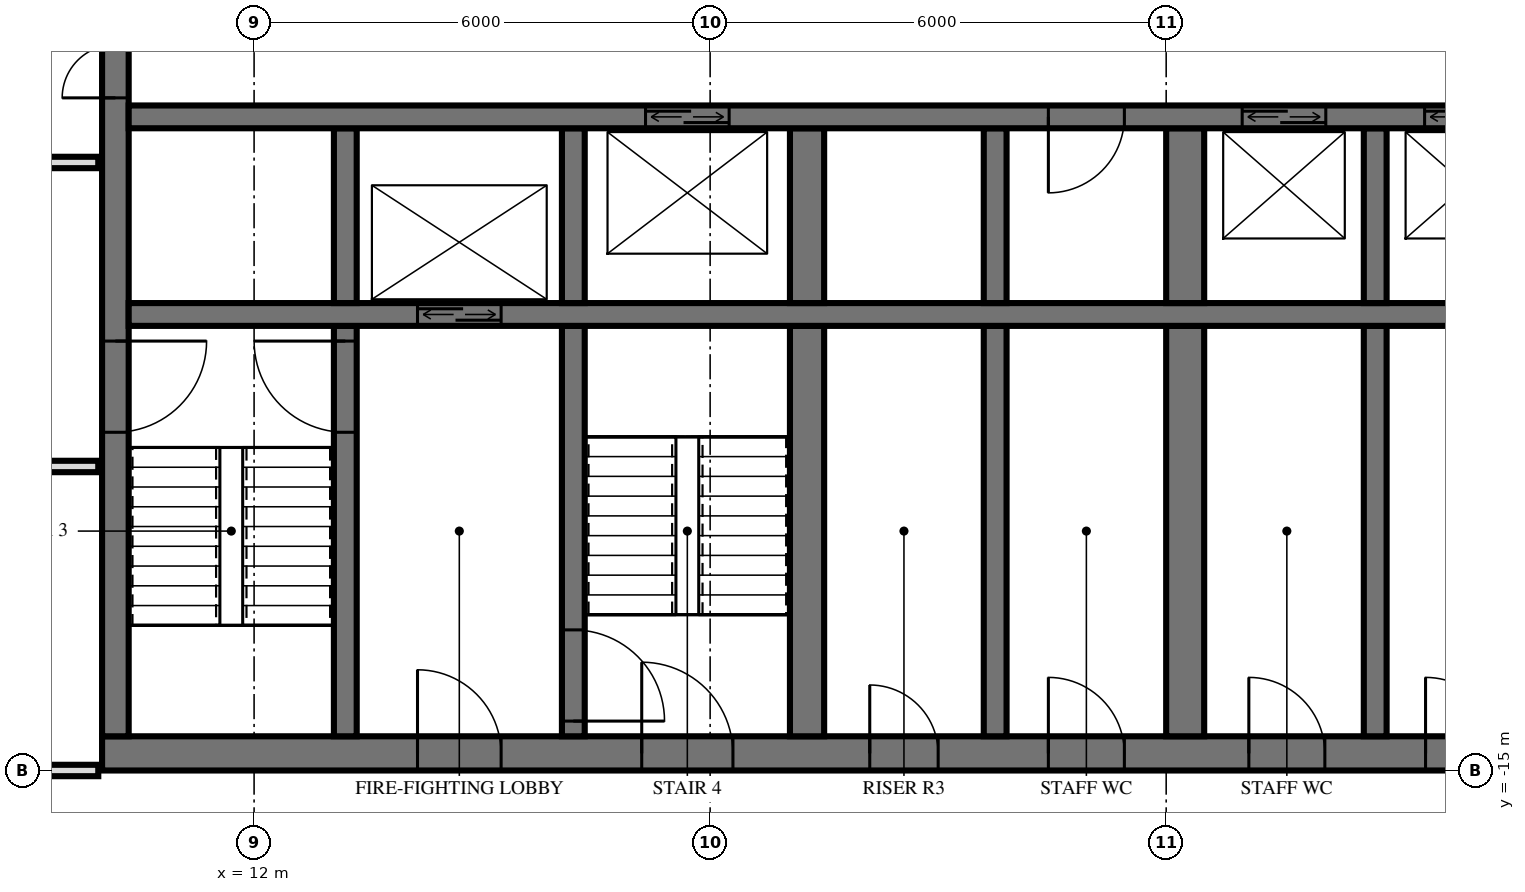
"""IFC4 building model, lengths in metres.
Left out: names, types, materials, properties, quantities, classifications, styles, units other than length and angle.
Written with IfcOpenShell. Run it as: python <this file> out.ifc"""

import sys

from ifc_helpers import new_model, si_unit, direction, frame, frame_2d, origin, place, context, subcontext, project, spatial, rectangle, extrude, element, fill, save


model = new_model("IFC4")
c1 = context("Model", 3, precision=1e-05, world=origin(), true_north=direction((0.0, 1.0)))
c2 = subcontext(c1, "Body", "Model", "MODEL_VIEW")
j1 = project(units=[si_unit("LENGTHUNIT", "METRE"), si_unit("PLANEANGLEUNIT", "RADIAN")], contexts=[c1])
p1 = place(None, origin())
s1 = spatial("IfcSite", under=j1, at=p1, CompositionType="ELEMENT")
p2 = place(p1, origin())
s2 = spatial("IfcBuilding", under=s1, at=p2, CompositionType="ELEMENT")
p3 = place(p2, frame((0.0, 0.0, 96.0)))
s3 = spatial("IfcBuildingStorey", under=s2, at=p3, CompositionType="ELEMENT", Elevation=96.0)
p4 = place(p3, frame((10.0, -14.775, 0.0), z_axis=(0.0, 0.0, 1.0), x_axis=(1.0, 0.0, 0.0)))
e1 = element("IfcWall", 1, at=p4, inside=s3, PredefinedType="SHEAR", context=c2, shape_type="SweptSolid", body=[
    extrude(rectangle(XDim=19.5, YDim=0.45, at=frame_2d((9.75, 0.0))), origin(), (0.0, 0.0, 1.0), 3.6),
])
p5 = place(p4, frame((7.1, 0.0, 0.0)))
e2 = element("IfcOpeningElement", 2, at=p5, cuts=e1, PredefinedType="OPENING", context=c2, shape_type="SweptSolid", body=[
    extrude(rectangle(XDim=1.2, YDim=2.1, at=frame_2d((0.6, 1.05))), frame((0.0, 0.235, 0.0), z_axis=(0.0, -1.0, 0.0), x_axis=(1.0, 0.0, 0.0)), (0.0, 0.0, 1.0), 0.47),
])
p6 = place(p4, frame((4.15, 0.0, 0.0)))
e3 = element("IfcOpeningElement", 3, at=p6, cuts=e1, PredefinedType="OPENING", context=c2, shape_type="SweptSolid", body=[
    extrude(rectangle(XDim=1.1, YDim=2.1, at=frame_2d((0.55, 1.05))), frame((0.0, 0.235, 0.0), z_axis=(0.0, -1.0, 0.0), x_axis=(1.0, 0.0, 0.0)), (0.0, 0.0, 1.0), 0.47),
])
p7 = place(p4, frame((10.1, 0.0, 0.0)))
e4 = element("IfcOpeningElement", 4, at=p7, cuts=e1, PredefinedType="OPENING", context=c2, shape_type="SweptSolid", body=[
    extrude(rectangle(XDim=0.9, YDim=2.1, at=frame_2d((0.45, 1.05))), frame((0.0, 0.235, 0.0), z_axis=(0.0, -1.0, 0.0), x_axis=(1.0, 0.0, 0.0)), (0.0, 0.0, 1.0), 0.47),
])
p8 = place(p4, frame((12.45, 0.0, 0.0)))
e5 = element("IfcOpeningElement", 5, at=p8, cuts=e1, PredefinedType="OPENING", context=c2, shape_type="SweptSolid", body=[
    extrude(rectangle(XDim=1.0, YDim=2.1, at=frame_2d((0.5, 1.05))), frame((0.0, 0.235, 0.0), z_axis=(0.0, -1.0, 0.0), x_axis=(1.0, 0.0, 0.0)), (0.0, 0.0, 1.0), 0.47),
])
p9 = place(p4, frame((15.087, 0.0, 0.0)))
e6 = element("IfcOpeningElement", 6, at=p9, cuts=e1, PredefinedType="OPENING", context=c2, shape_type="SweptSolid", body=[
    extrude(rectangle(XDim=1.0, YDim=2.1, at=frame_2d((0.5, 1.05))), frame((0.0, 0.235, 0.0), z_axis=(0.0, -1.0, 0.0), x_axis=(1.0, 0.0, 0.0)), (0.0, 0.0, 1.0), 0.47),
])
p10 = place(p4, frame((17.413, 0.0, 0.0)))
e7 = element("IfcOpeningElement", 7, at=p10, cuts=e1, PredefinedType="OPENING", context=c2, shape_type="SweptSolid", body=[
    extrude(rectangle(XDim=1.0, YDim=2.1, at=frame_2d((0.5, 1.05))), frame((0.0, 0.235, 0.0), z_axis=(0.0, -1.0, 0.0), x_axis=(1.0, 0.0, 0.0)), (0.0, 0.0, 1.0), 0.47),
])
p11 = place(p3, frame((10.175, -14.55, 0.0), z_axis=(0.0, 0.0, 1.0), x_axis=(0.0, 1.0, 0.0)))
e8 = element("IfcWall", 8, at=p11, inside=s3, PredefinedType="SHEAR", context=c2, shape_type="SweptSolid", body=[
    extrude(rectangle(XDim=14.1, YDim=0.35, at=frame_2d((7.05, 0.0))), origin(), (0.0, 0.0, 1.0), 3.6),
])
p12 = place(p11, frame((8.4, 0.0, 0.0)))
e9 = element("IfcOpeningElement", 9, at=p12, cuts=e8, PredefinedType="OPENING", context=c2, shape_type="SweptSolid", body=[
    extrude(rectangle(XDim=1.4, YDim=2.4, at=frame_2d((0.7, 1.2))), frame((0.0, 0.185, 0.0), z_axis=(0.0, -1.0, 0.0), x_axis=(1.0, 0.0, 0.0)), (0.0, 0.0, 1.0), 0.37),
])
p13 = place(p11, frame((10.0, 0.0, 0.0)))
e10 = element("IfcOpeningElement", 10, at=p13, cuts=e8, PredefinedType="OPENING", context=c2, shape_type="SweptSolid", body=[
    extrude(rectangle(XDim=1.4, YDim=2.4, at=frame_2d((0.7, 1.2))), frame((0.0, 0.185, 0.0), z_axis=(0.0, -1.0, 0.0), x_axis=(1.0, 0.0, 0.0)), (0.0, 0.0, 1.0), 0.37),
])
p14 = place(p11, frame((4.0, 0.0, 0.0)))
e11 = element("IfcOpeningElement", 11, at=p14, cuts=e8, PredefinedType="OPENING", context=c2, shape_type="SweptSolid", body=[
    extrude(rectangle(XDim=1.2, YDim=2.1, at=frame_2d((0.6, 1.05))), frame((0.0, 0.185, 0.0), z_axis=(0.0, -1.0, 0.0), x_axis=(1.0, 0.0, 0.0)), (0.0, 0.0, 1.0), 0.37),
])
p15 = place(p3, frame((10.35, -6.4, 0.0), z_axis=(0.0, 0.0, 1.0), x_axis=(1.0, 0.0, 0.0)))
e12 = element("IfcWall", 12, at=p15, inside=s3, PredefinedType="SHEAR", context=c2, shape_type="SweptSolid", body=[
    extrude(rectangle(XDim=18.7, YDim=0.3, at=frame_2d((9.35, 0.0))), origin(), (0.0, 0.0, 1.0), 3.6),
])
p16 = place(p15, frame((14.65, 0.0, 0.0)))
e13 = element("IfcOpeningElement", 13, at=p16, cuts=e12, PredefinedType="OPENING", context=c2, shape_type="SweptSolid", body=[
    extrude(rectangle(XDim=1.1, YDim=2.1, at=frame_2d((0.55, 1.05))), frame((0.0, 0.16, 0.0), z_axis=(0.0, -1.0, 0.0), x_axis=(1.0, 0.0, 0.0)), (0.0, 0.0, 1.0), 0.32),
])
p17 = place(p15, frame((17.05, 0.0, 0.0)))
e14 = element("IfcOpeningElement", 14, at=p17, cuts=e12, PredefinedType="OPENING", context=c2, shape_type="SweptSolid", body=[
    extrude(rectangle(XDim=1.1, YDim=2.1, at=frame_2d((0.55, 1.05))), frame((0.0, 0.16, 0.0), z_axis=(0.0, -1.0, 0.0), x_axis=(1.0, 0.0, 0.0)), (0.0, 0.0, 1.0), 0.32),
])
p18 = place(p15, frame((6.8, 0.0, 0.0)))
e15 = element("IfcOpeningElement", 15, at=p18, cuts=e12, PredefinedType="OPENING", context=c2, shape_type="SweptSolid", body=[
    extrude(rectangle(XDim=1.1, YDim=2.1, at=frame_2d((0.55, 1.05))), frame((0.0, 0.16, 0.0), z_axis=(0.0, -1.0, 0.0), x_axis=(1.0, 0.0, 0.0)), (0.0, 0.0, 1.0), 0.32),
])
p19 = place(p15, frame((12.1, 0.0, 0.0)))
e16 = element("IfcOpeningElement", 16, at=p19, cuts=e12, PredefinedType="OPENING", context=c2, shape_type="SweptSolid", body=[
    extrude(rectangle(XDim=1.0, YDim=2.1, at=frame_2d((0.5, 1.05))), frame((0.0, 0.16, 0.0), z_axis=(0.0, -1.0, 0.0), x_axis=(1.0, 0.0, 0.0)), (0.0, 0.0, 1.0), 0.32),
])
p20 = place(p3, frame((10.35, -9.0, 0.0), z_axis=(0.0, 0.0, 1.0), x_axis=(1.0, 0.0, 0.0)))
e17 = element("IfcWall", 17, at=p20, inside=s3, PredefinedType="SHEAR", context=c2, shape_type="SweptSolid", body=[
    extrude(rectangle(XDim=18.7, YDim=0.3, at=frame_2d((9.35, 0.0))), origin(), (0.0, 0.0, 1.0), 3.6),
])
p21 = place(p20, frame((3.8, 0.0, 0.0)))
e18 = element("IfcOpeningElement", 18, at=p21, cuts=e17, PredefinedType="OPENING", context=c2, shape_type="SweptSolid", body=[
    extrude(rectangle(XDim=1.1, YDim=2.1, at=frame_2d((0.55, 1.05))), frame((0.0, 0.16, 0.0), z_axis=(0.0, -1.0, 0.0), x_axis=(1.0, 0.0, 0.0)), (0.0, 0.0, 1.0), 0.32),
])
p22 = place(p3, frame((13.2, -8.85, 0.0), z_axis=(0.0, 0.0, 1.0), x_axis=(0.0, 1.0, 0.0)))
e19 = element("IfcWall", 19, at=p22, inside=s3, PredefinedType="SHEAR", context=c2, shape_type="SweptSolid", body=[
    extrude(rectangle(XDim=2.3, YDim=0.3, at=frame_2d((1.15, 0.0))), origin(), (0.0, 0.0, 1.0), 3.6),
])
p23 = place(p3, frame((13.2, -14.55, 0.0), z_axis=(0.0, 0.0, 1.0), x_axis=(0.0, 1.0, 0.0)))
e20 = element("IfcWall", 20, at=p23, inside=s3, PredefinedType="SHEAR", context=c2, shape_type="SweptSolid", body=[
    extrude(rectangle(XDim=5.4, YDim=0.3, at=frame_2d((2.7, 0.0))), origin(), (0.0, 0.0, 1.0), 3.6),
])
p24 = place(p23, frame((4.0, 0.0, 0.0)))
e21 = element("IfcOpeningElement", 21, at=p24, cuts=e20, PredefinedType="OPENING", context=c2, shape_type="SweptSolid", body=[
    extrude(rectangle(XDim=1.2, YDim=2.1, at=frame_2d((0.6, 1.05))), frame((0.0, 0.16, 0.0), z_axis=(0.0, -1.0, 0.0), x_axis=(1.0, 0.0, 0.0)), (0.0, 0.0, 1.0), 0.32),
])
p25 = place(p3, frame((16.2, -8.85, 0.0), z_axis=(0.0, 0.0, 1.0), x_axis=(0.0, 1.0, 0.0)))
e22 = element("IfcWall", 22, at=p25, inside=s3, PredefinedType="SHEAR", context=c2, shape_type="SweptSolid", body=[
    extrude(rectangle(XDim=2.3, YDim=0.3, at=frame_2d((1.15, 0.0))), origin(), (0.0, 0.0, 1.0), 3.6),
])
p26 = place(p3, frame((16.2, -14.55, 0.0), z_axis=(0.0, 0.0, 1.0), x_axis=(0.0, 1.0, 0.0)))
e23 = element("IfcWall", 23, at=p26, inside=s3, PredefinedType="SHEAR", context=c2, shape_type="SweptSolid", body=[
    extrude(rectangle(XDim=5.4, YDim=0.3, at=frame_2d((2.7, 0.0))), origin(), (0.0, 0.0, 1.0), 3.6),
])
p27 = place(p26, frame((0.2, 0.0, 0.0)))
e24 = element("IfcOpeningElement", 24, at=p27, cuts=e23, PredefinedType="OPENING", context=c2, shape_type="SweptSolid", body=[
    extrude(rectangle(XDim=1.2, YDim=2.1, at=frame_2d((0.6, 1.05))), frame((0.0, 0.16, 0.0), z_axis=(0.0, -1.0, 0.0), x_axis=(1.0, 0.0, 0.0)), (0.0, 0.0, 1.0), 0.32),
])
p28 = place(p3, frame((19.275, -8.85, 0.0), z_axis=(0.0, 0.0, 1.0), x_axis=(0.0, 1.0, 0.0)))
e25 = element("IfcWall", 25, at=p28, inside=s3, PredefinedType="SHEAR", context=c2, shape_type="SweptSolid", body=[
    extrude(rectangle(XDim=2.3, YDim=0.45, at=frame_2d((1.15, 0.0))), origin(), (0.0, 0.0, 1.0), 3.6),
])
p29 = place(p3, frame((19.275, -14.55, 0.0), z_axis=(0.0, 0.0, 1.0), x_axis=(0.0, 1.0, 0.0)))
e26 = element("IfcWall", 26, at=p29, inside=s3, PredefinedType="SHEAR", context=c2, shape_type="SweptSolid", body=[
    extrude(rectangle(XDim=5.4, YDim=0.45, at=frame_2d((2.7, 0.0))), origin(), (0.0, 0.0, 1.0), 3.6),
])
p30 = place(p3, frame((21.75, -8.85, 0.0), z_axis=(0.0, 0.0, 1.0), x_axis=(0.0, 1.0, 0.0)))
e27 = element("IfcWall", 27, at=p30, inside=s3, PredefinedType="SHEAR", context=c2, shape_type="SweptSolid", body=[
    extrude(rectangle(XDim=2.3, YDim=0.3, at=frame_2d((1.15, 0.0))), origin(), (0.0, 0.0, 1.0), 3.6),
])
p31 = place(p3, frame((21.75, -14.55, 0.0), z_axis=(0.0, 0.0, 1.0), x_axis=(0.0, 1.0, 0.0)))
e28 = element("IfcWall", 28, at=p31, inside=s3, PredefinedType="SHEAR", context=c2, shape_type="SweptSolid", body=[
    extrude(rectangle(XDim=5.4, YDim=0.3, at=frame_2d((2.7, 0.0))), origin(), (0.0, 0.0, 1.0), 3.6),
])
p32 = place(p3, frame((24.25, -8.85, 0.0), z_axis=(0.0, 0.0, 1.0), x_axis=(0.0, 1.0, 0.0)))
e29 = element("IfcWall", 29, at=p32, inside=s3, PredefinedType="SHEAR", context=c2, shape_type="SweptSolid", body=[
    extrude(rectangle(XDim=2.3, YDim=0.5, at=frame_2d((1.15, 0.0))), origin(), (0.0, 0.0, 1.0), 3.6),
])
p33 = place(p3, frame((24.25, -14.55, 0.0), z_axis=(0.0, 0.0, 1.0), x_axis=(0.0, 1.0, 0.0)))
e30 = element("IfcWall", 30, at=p33, inside=s3, PredefinedType="SHEAR", context=c2, shape_type="SweptSolid", body=[
    extrude(rectangle(XDim=5.4, YDim=0.5, at=frame_2d((2.7, 0.0))), origin(), (0.0, 0.0, 1.0), 3.6),
])
p34 = place(p3, frame((26.75, -8.85, 0.0), z_axis=(0.0, 0.0, 1.0), x_axis=(0.0, 1.0, 0.0)))
e31 = element("IfcWall", 31, at=p34, inside=s3, PredefinedType="SHEAR", context=c2, shape_type="SweptSolid", body=[
    extrude(rectangle(XDim=2.3, YDim=0.3, at=frame_2d((1.15, 0.0))), origin(), (0.0, 0.0, 1.0), 3.6),
])
p35 = place(p3, frame((26.75, -14.55, 0.0), z_axis=(0.0, 0.0, 1.0), x_axis=(0.0, 1.0, 0.0)))
e32 = element("IfcWall", 32, at=p35, inside=s3, PredefinedType="SHEAR", context=c2, shape_type="SweptSolid", body=[
    extrude(rectangle(XDim=5.4, YDim=0.3, at=frame_2d((2.7, 0.0))), origin(), (0.0, 0.0, 1.0), 3.6),
])
p36 = place(p3, frame((-9.95, -15.0, 0.0), z_axis=(0.0, 0.0, 1.0), x_axis=(1.0, 0.0, 0.0)))
e33 = element("IfcWall", 33, at=p36, inside=s3, PredefinedType="PARTITIONING", context=c2, shape_type="SweptSolid", body=[
    extrude(rectangle(XDim=19.9, YDim=0.15, at=frame_2d((9.95, 0.0))), origin(), (0.0, 0.0, 1.0), 2.684),
])
p37 = place(p36, frame((9.45, 0.0, 0.0)))
e34 = element("IfcOpeningElement", 34, at=p37, cuts=e33, PredefinedType="OPENING", context=c2, shape_type="SweptSolid", body=[
    extrude(rectangle(XDim=1.0, YDim=2.1, at=frame_2d((0.5, 1.05))), frame((0.0, 0.085, 0.0), z_axis=(0.0, -1.0, 0.0), x_axis=(1.0, 0.0, 0.0)), (0.0, 0.0, 1.0), 0.17),
])
p38 = place(p3, frame((-9.95, -11.0, 0.0), z_axis=(0.0, 0.0, 1.0), x_axis=(1.0, 0.0, 0.0)))
e35 = element("IfcWall", 35, at=p38, inside=s3, PredefinedType="PARTITIONING", context=c2, shape_type="SweptSolid", body=[
    extrude(rectangle(XDim=19.9, YDim=0.15, at=frame_2d((9.95, 0.0))), origin(), (0.0, 0.0, 1.0), 3.32),
])
p39 = place(p38, frame((9.45, 0.0, 0.0)))
e36 = element("IfcOpeningElement", 36, at=p39, cuts=e35, PredefinedType="OPENING", context=c2, shape_type="SweptSolid", body=[
    extrude(rectangle(XDim=1.0, YDim=2.1, at=frame_2d((0.5, 1.05))), frame((0.0, 0.085, 0.0), z_axis=(0.0, -1.0, 0.0), x_axis=(1.0, 0.0, 0.0)), (0.0, 0.0, 1.0), 0.17),
])
p40 = place(p38, frame((15.45, 0.0, 0.0)))
e37 = element("IfcOpeningElement", 37, at=p40, cuts=e35, PredefinedType="OPENING", context=c2, shape_type="SweptSolid", body=[
    extrude(rectangle(XDim=1.0, YDim=2.1, at=frame_2d((0.5, 1.05))), frame((0.0, 0.085, 0.0), z_axis=(0.0, -1.0, 0.0), x_axis=(1.0, 0.0, 0.0)), (0.0, 0.0, 1.0), 0.17),
])
p41 = place(p3, frame((-9.95, -7.0, 0.0), z_axis=(0.0, 0.0, 1.0), x_axis=(1.0, 0.0, 0.0)))
e38 = element("IfcWall", 38, at=p41, inside=s3, PredefinedType="PARTITIONING", context=c2, shape_type="SweptSolid", body=[
    extrude(rectangle(XDim=19.9, YDim=0.15, at=frame_2d((9.95, 0.0))), origin(), (0.0, 0.0, 1.0), 3.32),
])
p42 = place(p41, frame((9.45, 0.0, 0.0)))
e39 = element("IfcOpeningElement", 39, at=p42, cuts=e38, PredefinedType="OPENING", context=c2, shape_type="SweptSolid", body=[
    extrude(rectangle(XDim=1.0, YDim=2.1, at=frame_2d((0.5, 1.05))), frame((0.0, 0.085, 0.0), z_axis=(0.0, -1.0, 0.0), x_axis=(1.0, 0.0, 0.0)), (0.0, 0.0, 1.0), 0.17),
])
p43 = place(p41, frame((3.45, 0.0, 0.0)))
e40 = element("IfcOpeningElement", 40, at=p43, cuts=e38, PredefinedType="OPENING", context=c2, shape_type="SweptSolid", body=[
    extrude(rectangle(XDim=1.0, YDim=2.1, at=frame_2d((0.5, 1.05))), frame((0.0, 0.085, 0.0), z_axis=(0.0, -1.0, 0.0), x_axis=(1.0, 0.0, 0.0)), (0.0, 0.0, 1.0), 0.17),
])
p44 = place(p16, origin())
e41 = element("IfcDoor", 41, at=p44, inside=s3, OperationType="DOUBLE_DOOR_SLIDING", PredefinedType="USERDEFINED", context=c2, shape_type="SweptSolid", body=[
    extrude(rectangle(XDim=1.1, YDim=2.1, at=frame_2d((0.55, 1.05))), frame((0.0, 0.025, 0.0), z_axis=(0.0, -1.0, 0.0), x_axis=(1.0, 0.0, 0.0)), (0.0, 0.0, 1.0), 0.05),
])
fill(e13, e41)
p45 = place(p17, origin())
e42 = element("IfcDoor", 42, at=p45, inside=s3, OperationType="DOUBLE_DOOR_SLIDING", PredefinedType="USERDEFINED", context=c2, shape_type="SweptSolid", body=[
    extrude(rectangle(XDim=1.1, YDim=2.1, at=frame_2d((0.55, 1.05))), frame((0.0, 0.025, 0.0), z_axis=(0.0, -1.0, 0.0), x_axis=(1.0, 0.0, 0.0)), (0.0, 0.0, 1.0), 0.05),
])
fill(e14, e42)
p46 = place(p21, origin())
e43 = element("IfcDoor", 43, at=p46, inside=s3, OperationType="DOUBLE_DOOR_SLIDING", PredefinedType="USERDEFINED", context=c2, shape_type="SweptSolid", body=[
    extrude(rectangle(XDim=1.1, YDim=2.1, at=frame_2d((0.55, 1.05))), frame((0.0, 0.025, 0.0), z_axis=(0.0, -1.0, 0.0), x_axis=(1.0, 0.0, 0.0)), (0.0, 0.0, 1.0), 0.05),
])
fill(e18, e43)
p47 = place(p18, origin())
e44 = element("IfcDoor", 44, at=p47, inside=s3, OperationType="DOUBLE_DOOR_SLIDING", PredefinedType="USERDEFINED", context=c2, shape_type="SweptSolid", body=[
    extrude(rectangle(XDim=1.1, YDim=2.1, at=frame_2d((0.55, 1.05))), frame((0.0, 0.025, 0.0), z_axis=(0.0, -1.0, 0.0), x_axis=(1.0, 0.0, 0.0)), (0.0, 0.0, 1.0), 0.05),
])
fill(e15, e44)
p48 = place(p12, origin())
e45 = element("IfcDoor", 45, at=p48, inside=s3, OperationType="DOUBLE_DOOR_SINGLE_SWING", PredefinedType="DOOR", context=c2, shape_type="SweptSolid", body=[
    extrude(rectangle(XDim=1.4, YDim=2.4, at=frame_2d((0.7, 1.2))), frame((0.0, 0.025, 0.0), z_axis=(0.0, -1.0, 0.0), x_axis=(1.0, 0.0, 0.0)), (0.0, 0.0, 1.0), 0.05),
])
fill(e9, e45)
p49 = place(p14, frame((0.6, 0.0, 0.0), z_axis=(0.0, 0.0, 1.0), x_axis=(-1.0, 0.0, 0.0)))
e46 = element("IfcDoor", 46, at=p49, inside=s3, OperationType="SINGLE_SWING_RIGHT", PredefinedType="DOOR", context=c2, shape_type="SweptSolid", body=[
    extrude(rectangle(XDim=1.2, YDim=2.1, at=frame_2d((0.0, 1.05))), frame((0.0, -0.025, 0.0), z_axis=(0.0, 1.0, 0.0), x_axis=(-1.0, 0.0, 0.0)), (0.0, 0.0, 1.0), 0.05),
])
fill(e11, e46)
p50 = place(p5, origin())
e47 = element("IfcDoor", 47, at=p50, inside=s3, OperationType="SINGLE_SWING_RIGHT", PredefinedType="DOOR", context=c2, shape_type="SweptSolid", body=[
    extrude(rectangle(XDim=1.2, YDim=2.1, at=frame_2d((0.6, 1.05))), frame((0.0, 0.025, 0.0), z_axis=(0.0, -1.0, 0.0), x_axis=(1.0, 0.0, 0.0)), (0.0, 0.0, 1.0), 0.05),
])
fill(e2, e47)
p51 = place(p6, origin())
e48 = element("IfcDoor", 48, at=p51, inside=s3, OperationType="SINGLE_SWING_RIGHT", PredefinedType="DOOR", context=c2, shape_type="SweptSolid", body=[
    extrude(rectangle(XDim=1.1, YDim=2.1, at=frame_2d((0.55, 1.05))), frame((0.0, 0.025, 0.0), z_axis=(0.0, -1.0, 0.0), x_axis=(1.0, 0.0, 0.0)), (0.0, 0.0, 1.0), 0.05),
])
fill(e3, e48)
p52 = place(p7, origin())
e49 = element("IfcDoor", 49, at=p52, inside=s3, OperationType="SINGLE_SWING_RIGHT", PredefinedType="DOOR", context=c2, shape_type="SweptSolid", body=[
    extrude(rectangle(XDim=0.9, YDim=2.1, at=frame_2d((0.45, 1.05))), frame((0.0, 0.025, 0.0), z_axis=(0.0, -1.0, 0.0), x_axis=(1.0, 0.0, 0.0)), (0.0, 0.0, 1.0), 0.05),
])
fill(e4, e49)
p53 = place(p8, origin())
e50 = element("IfcDoor", 50, at=p53, inside=s3, OperationType="SINGLE_SWING_RIGHT", PredefinedType="DOOR", context=c2, shape_type="SweptSolid", body=[
    extrude(rectangle(XDim=1.0, YDim=2.1, at=frame_2d((0.5, 1.05))), frame((0.0, 0.025, 0.0), z_axis=(0.0, -1.0, 0.0), x_axis=(1.0, 0.0, 0.0)), (0.0, 0.0, 1.0), 0.05),
])
fill(e5, e50)
p54 = place(p9, origin())
e51 = element("IfcDoor", 51, at=p54, inside=s3, OperationType="SINGLE_SWING_RIGHT", PredefinedType="DOOR", context=c2, shape_type="SweptSolid", body=[
    extrude(rectangle(XDim=1.0, YDim=2.1, at=frame_2d((0.5, 1.05))), frame((0.0, 0.025, 0.0), z_axis=(0.0, -1.0, 0.0), x_axis=(1.0, 0.0, 0.0)), (0.0, 0.0, 1.0), 0.05),
])
fill(e6, e51)
p55 = place(p10, origin())
e52 = element("IfcDoor", 52, at=p55, inside=s3, OperationType="SINGLE_SWING_RIGHT", PredefinedType="DOOR", context=c2, shape_type="SweptSolid", body=[
    extrude(rectangle(XDim=1.0, YDim=2.1, at=frame_2d((0.5, 1.05))), frame((0.0, 0.025, 0.0), z_axis=(0.0, -1.0, 0.0), x_axis=(1.0, 0.0, 0.0)), (0.0, 0.0, 1.0), 0.05),
])
fill(e7, e52)
p56 = place(p19, frame((0.5, 0.0, 0.0), z_axis=(0.0, 0.0, 1.0), x_axis=(-1.0, 0.0, 0.0)))
e53 = element("IfcDoor", 53, at=p56, inside=s3, OperationType="SINGLE_SWING_LEFT", PredefinedType="DOOR", context=c2, shape_type="SweptSolid", body=[
    extrude(rectangle(XDim=1.0, YDim=2.1, at=frame_2d((0.0, 1.05))), frame((0.0, -0.025, 0.0), z_axis=(0.0, 1.0, 0.0), x_axis=(-1.0, 0.0, 0.0)), (0.0, 0.0, 1.0), 0.05),
])
fill(e16, e53)
p57 = place(p24, origin())
e54 = element("IfcDoor", 54, at=p57, inside=s3, OperationType="SINGLE_SWING_LEFT", PredefinedType="DOOR", context=c2, shape_type="SweptSolid", body=[
    extrude(rectangle(XDim=1.2, YDim=2.1, at=frame_2d((0.6, 1.05))), frame((0.0, 0.025, 0.0), z_axis=(0.0, -1.0, 0.0), x_axis=(1.0, 0.0, 0.0)), (0.0, 0.0, 1.0), 0.05),
])
fill(e21, e54)
p58 = place(p27, frame((0.6, 0.0, 0.0), z_axis=(0.0, 0.0, 1.0), x_axis=(-1.0, 0.0, 0.0)))
e55 = element("IfcDoor", 55, at=p58, inside=s3, OperationType="SINGLE_SWING_LEFT", PredefinedType="DOOR", context=c2, shape_type="SweptSolid", body=[
    extrude(rectangle(XDim=1.2, YDim=2.1, at=frame_2d((0.0, 1.05))), frame((0.0, -0.025, 0.0), z_axis=(0.0, 1.0, 0.0), x_axis=(-1.0, 0.0, 0.0)), (0.0, 0.0, 1.0), 0.05),
])
fill(e24, e55)
save(model, sys.argv[1])
